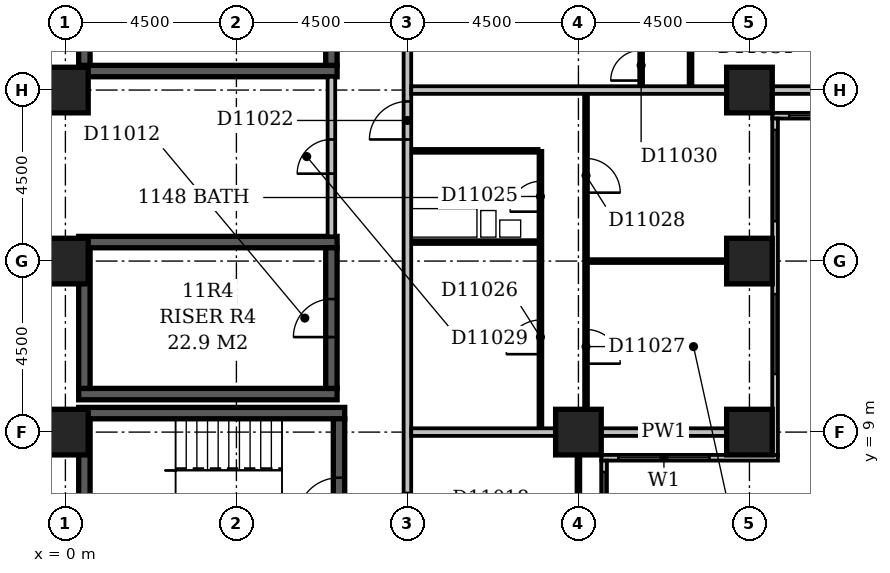
"""IFC4 building model, lengths in metres.
Left out: names, types, materials, properties, quantities, classifications, styles, units other than length and angle.
Written with IfcOpenShell. Run it as: python <this file> out.ifc"""

import sys

from ifc_helpers import new_model, si_unit, direction, frame, frame_2d, origin, origin_2d, place, context, subcontext, project, spatial, rectangle, extrude, element, fill, save


model = new_model("IFC4")
c1 = context("Model", 3, precision=1e-05, world=origin(), true_north=direction((0.0, 1.0)))
c2 = subcontext(c1, "Body", "Model", "MODEL_VIEW")
j1 = project(units=[si_unit("LENGTHUNIT", "METRE"), si_unit("PLANEANGLEUNIT", "RADIAN")], contexts=[c1])
p1 = place(None, origin())
s1 = spatial("IfcSite", under=j1, at=p1, CompositionType="ELEMENT")
p2 = place(p1, origin())
s2 = spatial("IfcBuilding", under=s1, at=p2, CompositionType="ELEMENT")
p3 = place(p2, frame((0.0, 0.0, 50.6)))
s3 = spatial("IfcBuildingStorey", under=s2, at=p3, CompositionType="ELEMENT", Elevation=50.6)
p4 = place(p3, frame((0.35, 9.5, -0.3), z_axis=(0.0, 0.0, 1.0), x_axis=(1.0, 0.0, 0.0)))
e1 = element("IfcWall", 1, at=p4, inside=s3, PredefinedType="SHEAR", context=c2, shape_type="SweptSolid", body=[
    extrude(rectangle(XDim=7.0, YDim=0.3, at=frame_2d((3.5, 0.0))), origin(), (0.0, 0.0, 1.0), 3.6),
])
for number, where, z_axis, x_axis in (
    (2, (0.35, 10.0, -0.3), (0.0, 0.0, 1.0), (1.0, 0.0, 0.0)),
    (3, (0.35, 14.0, -0.3), (0.0, 0.0, 1.0), (1.0, 0.0, 0.0)),
    (4, (0.35, 18.5, -0.3), (0.0, 0.0, 1.0), (1.0, 0.0, 0.0)),
):
    element("IfcWall", number, at=place(p3, frame(where, z_axis=z_axis, x_axis=x_axis)), inside=s3, PredefinedType="SHEAR", context=c2, shape_type="SweptSolid", body=[
        extrude(rectangle(XDim=6.8, YDim=0.3, at=frame_2d((3.4, 0.0))), origin(), (0.0, 0.0, 1.0), 3.6),
    ])
p5 = place(p3, frame((0.5, 5.15, -0.3), z_axis=(0.0, 0.0, 1.0), x_axis=(0.0, 1.0, 0.0)))
e5 = element("IfcWall", 5, at=p5, inside=s3, PredefinedType="SHEAR", context=c2, shape_type="SweptSolid", body=[
    extrude(rectangle(XDim=4.2, YDim=0.3, at=frame_2d((2.1, 0.0))), origin(), (0.0, 0.0, 1.0), 3.6),
])
for number, where, z_axis, x_axis in (
    (6, (0.5, 10.15, -0.3), (0.0, 0.0, 1.0), (0.0, 1.0, 0.0)),
    (7, (0.5, 18.65, -0.3), (0.0, 0.0, 1.0), (0.0, 1.0, 0.0)),
):
    element("IfcWall", number, at=place(p3, frame(where, z_axis=z_axis, x_axis=x_axis)), inside=s3, PredefinedType="SHEAR", context=c2, shape_type="SweptSolid", body=[
        extrude(rectangle(XDim=3.7, YDim=0.3, at=frame_2d((1.85, 0.0))), origin(), (0.0, 0.0, 1.0), 3.6),
    ])
p6 = place(p3, frame((7.0, 10.15, -0.3), z_axis=(0.0, 0.0, 1.0), x_axis=(0.0, 1.0, 0.0)))
e8 = element("IfcWall", 8, at=p6, inside=s3, PredefinedType="SHEAR", context=c2, shape_type="SweptSolid", body=[
    extrude(rectangle(XDim=3.7, YDim=0.3, at=frame_2d((1.85, 0.0))), origin(), (0.0, 0.0, 1.0), 3.6),
])
p7 = place(p6, frame((1.35, 0.0, 0.3)))
e9 = element("IfcOpeningElement", 9, at=p7, cuts=e8, PredefinedType="OPENING", context=c2, shape_type="SweptSolid", body=[
    extrude(rectangle(XDim=1.0, YDim=2.1, at=frame_2d((0.5, 1.05))), frame((0.0, 0.162, 0.0), z_axis=(0.0, -1.0, 0.0), x_axis=(1.0, 0.0, 0.0)), (0.0, 0.0, 1.0), 0.324),
])
p8 = place(p3, frame((7.0, 18.65, -0.3), z_axis=(0.0, 0.0, 1.0), x_axis=(0.0, 1.0, 0.0)))
e10 = element("IfcWall", 10, at=p8, inside=s3, PredefinedType="SHEAR", context=c2, shape_type="SweptSolid", body=[
    extrude(rectangle(XDim=3.7, YDim=0.3, at=frame_2d((1.85, 0.0))), origin(), (0.0, 0.0, 1.0), 3.6),
])
p9 = place(p8, frame((1.35, 0.0, 0.3)))
e11 = element("IfcOpeningElement", 11, at=p9, cuts=e10, PredefinedType="OPENING", context=c2, shape_type="SweptSolid", body=[
    extrude(rectangle(XDim=1.0, YDim=2.1, at=frame_2d((0.5, 1.05))), frame((0.0, 0.162, 0.0), z_axis=(0.0, -1.0, 0.0), x_axis=(1.0, 0.0, 0.0)), (0.0, 0.0, 1.0), 0.324),
])
p10 = place(p3, frame((7.2, 5.15, -0.3), z_axis=(0.0, 0.0, 1.0), x_axis=(0.0, 1.0, 0.0)))
e12 = element("IfcWall", 12, at=p10, inside=s3, PredefinedType="SHEAR", context=c2, shape_type="SweptSolid", body=[
    extrude(rectangle(XDim=4.2, YDim=0.3, at=frame_2d((2.1, 0.0))), origin(), (0.0, 0.0, 1.0), 3.6),
])
p11 = place(p10, frame((1.55, 0.0, 0.3)))
e13 = element("IfcOpeningElement", 13, at=p11, cuts=e12, PredefinedType="OPENING", context=c2, shape_type="SweptSolid", body=[
    extrude(rectangle(XDim=1.1, YDim=2.1, at=frame_2d((0.55, 1.05))), frame((0.0, 0.162, 0.0), z_axis=(0.0, -1.0, 0.0), x_axis=(1.0, 0.0, 0.0)), (0.0, 0.0, 1.0), 0.324),
])
for number, where, z_axis, x_axis in (
    (14, (0.0, 9.0, -0.3), (0.0, 0.0, 1.0), (1.0, 0.0, 0.0)),
    (15, (13.5, 9.0, -0.3), (0.0, 0.0, 1.0), (1.0, 0.0, 0.0)),
    (16, (18.0, 9.0, -0.3), (0.0, 0.0, 1.0), (1.0, 0.0, 0.0)),
    (17, (0.0, 13.5, -0.3), (0.0, 0.0, 1.0), (1.0, 0.0, 0.0)),
    (18, (18.0, 13.5, -0.3), (0.0, 0.0, 1.0), (1.0, 0.0, 0.0)),
    (19, (0.0, 18.0, -0.3), (0.0, 0.0, 1.0), (1.0, 0.0, 0.0)),
    (20, (18.0, 18.0, -0.3), (0.0, 0.0, 1.0), (1.0, 0.0, 0.0)),
):
    element("IfcColumn", number, at=place(p3, frame(where, z_axis=z_axis, x_axis=x_axis)), inside=s3, PredefinedType="COLUMN", context=c2, shape_type="SweptSolid", body=[
        extrude(rectangle(XDim=1.2, YDim=1.2, at=origin_2d()), origin(), (0.0, 0.0, 1.0), 3.6),
    ])
p12 = place(p3, frame((14.175, 3.9, 0.0), z_axis=(0.0, 0.0, 1.0), x_axis=(0.0, 1.0, 0.0)))
e21 = element("IfcWall", 21, at=p12, inside=s3, PredefinedType="STANDARD", context=c2, shape_type="SweptSolid", body=[
    extrude(rectangle(XDim=4.35, YDim=0.15, at=frame_2d((2.175, 0.0))), origin(), (0.0, 0.0, 1.0), 2.7),
])
p13 = place(p12, frame((1.65, 0.0, 0.6)))
e22 = element("IfcOpeningElement", 22, at=p13, cuts=e21, PredefinedType="OPENING", context=c2, shape_type="SweptSolid", body=[
    extrude(rectangle(XDim=2.4, YDim=1.8, at=frame_2d((1.2, 0.9))), frame((0.0, 0.087, 0.0), z_axis=(0.0, -1.0, 0.0), x_axis=(1.0, 0.0, 0.0)), (0.0, 0.0, 1.0), 0.174),
])
p14 = place(p3, frame((14.1, 8.325, 0.0), z_axis=(0.0, 0.0, 1.0), x_axis=(1.0, 0.0, 0.0)))
e23 = element("IfcWall", 23, at=p14, inside=s3, PredefinedType="STANDARD", context=c2, shape_type="SweptSolid", body=[
    extrude(rectangle(XDim=4.65, YDim=0.15, at=frame_2d((2.325, 0.0))), origin(), (0.0, 0.0, 1.0), 2.7),
])
p15 = place(p14, frame((0.45, 0.0, 0.6)))
e24 = element("IfcOpeningElement", 24, at=p15, cuts=e23, PredefinedType="OPENING", context=c2, shape_type="SweptSolid", body=[
    extrude(rectangle(XDim=2.4, YDim=1.8, at=frame_2d((1.2, 0.9))), frame((0.0, 0.087, 0.0), z_axis=(0.0, -1.0, 0.0), x_axis=(1.0, 0.0, 0.0)), (0.0, 0.0, 1.0), 0.174),
])
p16 = place(p3, frame((18.675, 8.4, 0.0), z_axis=(0.0, 0.0, 1.0), x_axis=(0.0, 1.0, 0.0)))
e25 = element("IfcWall", 25, at=p16, inside=s3, PredefinedType="STANDARD", context=c2, shape_type="SweptSolid", body=[
    extrude(rectangle(XDim=8.85, YDim=0.15, at=frame_2d((4.425, 0.0))), origin(), (0.0, 0.0, 1.0), 2.7),
])
p17 = place(p16, frame((2.13, 0.0, 0.6)))
e26 = element("IfcOpeningElement", 26, at=p17, cuts=e25, PredefinedType="OPENING", context=c2, shape_type="SweptSolid", body=[
    extrude(rectangle(XDim=2.1, YDim=1.8, at=frame_2d((1.05, 0.9))), frame((0.0, 0.087, 0.0), z_axis=(0.0, -1.0, 0.0), x_axis=(1.0, 0.0, 0.0)), (0.0, 0.0, 1.0), 0.174),
])
p18 = place(p16, frame((6.15, 0.0, 0.6)))
e27 = element("IfcOpeningElement", 27, at=p18, cuts=e25, PredefinedType="OPENING", context=c2, shape_type="SweptSolid", body=[
    extrude(rectangle(XDim=2.4, YDim=1.8, at=frame_2d((1.2, 0.9))), frame((0.0, 0.087, 0.0), z_axis=(0.0, -1.0, 0.0), x_axis=(1.0, 0.0, 0.0)), (0.0, 0.0, 1.0), 0.174),
])
p19 = place(p3, frame((18.6, 17.325, 0.0), z_axis=(0.0, 0.0, 1.0), x_axis=(1.0, 0.0, 0.0)))
e28 = element("IfcWall", 28, at=p19, inside=s3, PredefinedType="STANDARD", context=c2, shape_type="SweptSolid", body=[
    extrude(rectangle(XDim=4.65, YDim=0.15, at=frame_2d((2.325, 0.0))), origin(), (0.0, 0.0, 1.0), 2.7),
])
p20 = place(p19, frame((0.45, 0.0, 0.6)))
e29 = element("IfcOpeningElement", 29, at=p20, cuts=e28, PredefinedType="OPENING", context=c2, shape_type="SweptSolid", body=[
    extrude(rectangle(XDim=2.4, YDim=1.8, at=frame_2d((1.2, 0.9))), frame((0.0, 0.087, 0.0), z_axis=(0.0, -1.0, 0.0), x_axis=(1.0, 0.0, 0.0)), (0.0, 0.0, 1.0), 0.174),
])
p21 = place(p3, frame((9.0, 5.0, 0.0), z_axis=(0.0, 0.0, 1.0), x_axis=(0.0, 1.0, 0.0)))
e30 = element("IfcWall", 30, at=p21, inside=s3, PredefinedType="PARTITIONING", context=c2, shape_type="SweptSolid", body=[
    extrude(rectangle(XDim=44.5, YDim=0.2, at=frame_2d((22.25, 0.0))), origin(), (0.0, 0.0, 1.0), 3.3),
])
p22 = place(p21, frame((28.45, 0.0, 0.0)))
e31 = element("IfcOpeningElement", 31, at=p22, cuts=e30, PredefinedType="OPENING", context=c2, shape_type="SweptSolid", body=[
    extrude(rectangle(XDim=1.0, YDim=2.1, at=frame_2d((0.5, 1.05))), frame((0.0, 0.112, 0.0), z_axis=(0.0, -1.0, 0.0), x_axis=(1.0, 0.0, 0.0)), (0.0, 0.0, 1.0), 0.224),
])
p23 = place(p21, frame((17.8, 0.0, 0.0)))
e32 = element("IfcOpeningElement", 32, at=p23, cuts=e30, PredefinedType="OPENING", context=c2, shape_type="SweptSolid", body=[
    extrude(rectangle(XDim=1.0, YDim=2.1, at=frame_2d((0.5, 1.05))), frame((0.0, 0.112, 0.0), z_axis=(0.0, -1.0, 0.0), x_axis=(1.0, 0.0, 0.0)), (0.0, 0.0, 1.0), 0.224),
])
p24 = place(p21, frame((14.55, 0.0, 0.0)))
e33 = element("IfcOpeningElement", 33, at=p24, cuts=e30, PredefinedType="OPENING", context=c2, shape_type="SweptSolid", body=[
    extrude(rectangle(XDim=1.0, YDim=2.1, at=frame_2d((0.5, 1.05))), frame((0.0, 0.112, 0.0), z_axis=(0.0, -1.0, 0.0), x_axis=(1.0, 0.0, 0.0)), (0.0, 0.0, 1.0), 0.224),
])
p25 = place(p21, frame((11.7, 0.0, 0.0)))
e34 = element("IfcOpeningElement", 34, at=p25, cuts=e30, PredefinedType="OPENING", context=c2, shape_type="SweptSolid", body=[
    extrude(rectangle(XDim=1.0, YDim=2.1, at=frame_2d((0.5, 1.05))), frame((0.0, 0.112, 0.0), z_axis=(0.0, -1.0, 0.0), x_axis=(1.0, 0.0, 0.0)), (0.0, 0.0, 1.0), 0.224),
])
p26 = place(p21, frame((35.0, 0.0, 0.0)))
e35 = element("IfcOpeningElement", 35, at=p26, cuts=e30, PredefinedType="OPENING", context=c2, shape_type="SweptSolid", body=[
    extrude(rectangle(XDim=0.9, YDim=2.1, at=frame_2d((0.45, 1.05))), frame((0.0, 0.112, 0.0), z_axis=(0.0, -1.0, 0.0), x_axis=(1.0, 0.0, 0.0)), (0.0, 0.0, 1.0), 0.224),
])
p27 = place(p21, frame((1.5, 0.0, 0.0)))
e36 = element("IfcOpeningElement", 36, at=p27, cuts=e30, PredefinedType="OPENING", context=c2, shape_type="SweptSolid", body=[
    extrude(rectangle(XDim=0.9, YDim=2.1, at=frame_2d((0.45, 1.05))), frame((0.0, 0.112, 0.0), z_axis=(0.0, -1.0, 0.0), x_axis=(1.0, 0.0, 0.0)), (0.0, 0.0, 1.0), 0.224),
])
p28 = place(p3, frame((13.5, 5.1, 0.0), z_axis=(0.0, 0.0, 1.0), x_axis=(0.0, 1.0, 0.0)))
e37 = element("IfcWall", 37, at=p28, inside=s3, PredefinedType="PARTITIONING", context=c2, shape_type="SweptSolid", body=[
    extrude(rectangle(XDim=3.3, YDim=0.1, at=frame_2d((1.65, 0.0))), origin(), (0.0, 0.0, 1.0), 2.7),
])
p29 = place(p3, frame((9.1, 9.0, 0.0), z_axis=(0.0, 0.0, 1.0), x_axis=(1.0, 0.0, 0.0)))
e38 = element("IfcWall", 38, at=p29, inside=s3, PredefinedType="PARTITIONING", context=c2, shape_type="SweptSolid", body=[
    extrude(rectangle(XDim=3.8, YDim=0.2, at=frame_2d((1.9, 0.0))), origin(), (0.0, 0.0, 1.0), 3.3),
])
p30 = place(p3, frame((14.1, 9.0, 0.0), z_axis=(0.0, 0.0, 1.0), x_axis=(1.0, 0.0, 0.0)))
e39 = element("IfcWall", 39, at=p30, inside=s3, PredefinedType="PARTITIONING", context=c2, shape_type="SweptSolid", body=[
    extrude(rectangle(XDim=3.3, YDim=0.2, at=frame_2d((1.65, 0.0))), origin(), (0.0, 0.0, 1.0), 2.7),
])
p31 = place(p3, frame((12.5, 9.1, 0.0), z_axis=(0.0, 0.0, 1.0), x_axis=(0.0, 1.0, 0.0)))
e40 = element("IfcWall", 40, at=p31, inside=s3, PredefinedType="PARTITIONING", context=c2, shape_type="SweptSolid", body=[
    extrude(rectangle(XDim=7.3, YDim=0.1, at=frame_2d((3.65, 0.0))), origin(), (0.0, 0.0, 1.0), 3.3),
])
p32 = place(p31, frame((5.7, 0.0, 0.0)))
e41 = element("IfcOpeningElement", 41, at=p32, cuts=e40, PredefinedType="OPENING", context=c2, shape_type="SweptSolid", body=[
    extrude(rectangle(XDim=0.8, YDim=2.1, at=frame_2d((0.4, 1.05))), frame((0.0, 0.062, 0.0), z_axis=(0.0, -1.0, 0.0), x_axis=(1.0, 0.0, 0.0)), (0.0, 0.0, 1.0), 0.124),
])
p33 = place(p31, frame((1.95, 0.0, 0.0)))
e42 = element("IfcOpeningElement", 42, at=p33, cuts=e40, PredefinedType="OPENING", context=c2, shape_type="SweptSolid", body=[
    extrude(rectangle(XDim=0.9, YDim=2.1, at=frame_2d((0.45, 1.05))), frame((0.0, 0.062, 0.0), z_axis=(0.0, -1.0, 0.0), x_axis=(1.0, 0.0, 0.0)), (0.0, 0.0, 1.0), 0.124),
])
p34 = place(p3, frame((13.7, 9.6, 0.0), z_axis=(0.0, 0.0, 1.0), x_axis=(0.0, 1.0, 0.0)))
e43 = element("IfcWall", 43, at=p34, inside=s3, PredefinedType="PARTITIONING", context=c2, shape_type="SweptSolid", body=[
    extrude(rectangle(XDim=8.3, YDim=0.1, at=frame_2d((4.15, 0.0))), origin(), (0.0, 0.0, 1.0), 3.3),
])
p35 = place(p34, frame((1.2, 0.0, 0.0)))
e44 = element("IfcOpeningElement", 44, at=p35, cuts=e43, PredefinedType="OPENING", context=c2, shape_type="SweptSolid", body=[
    extrude(rectangle(XDim=0.9, YDim=2.1, at=frame_2d((0.45, 1.05))), frame((0.0, 0.062, 0.0), z_axis=(0.0, -1.0, 0.0), x_axis=(1.0, 0.0, 0.0)), (0.0, 0.0, 1.0), 0.124),
])
p36 = place(p34, frame((5.7, 0.0, 0.0)))
e45 = element("IfcOpeningElement", 45, at=p36, cuts=e43, PredefinedType="OPENING", context=c2, shape_type="SweptSolid", body=[
    extrude(rectangle(XDim=0.9, YDim=2.1, at=frame_2d((0.45, 1.05))), frame((0.0, 0.062, 0.0), z_axis=(0.0, -1.0, 0.0), x_axis=(1.0, 0.0, 0.0)), (0.0, 0.0, 1.0), 0.124),
])
p37 = place(p3, frame((13.75, 13.5, 0.0), z_axis=(0.0, 0.0, 1.0), x_axis=(1.0, 0.0, 0.0)))
e46 = element("IfcWall", 46, at=p37, inside=s3, PredefinedType="PARTITIONING", context=c2, shape_type="SweptSolid", body=[
    extrude(rectangle(XDim=3.65, YDim=0.1, at=frame_2d((1.825, 0.0))), origin(), (0.0, 0.0, 1.0), 3.3),
])
p38 = place(p3, frame((9.1, 14.0, 0.0), z_axis=(0.0, 0.0, 1.0), x_axis=(1.0, 0.0, 0.0)))
e47 = element("IfcWall", 47, at=p38, inside=s3, PredefinedType="PLUMBINGWALL", context=c2, shape_type="SweptSolid", body=[
    extrude(rectangle(XDim=3.35, YDim=0.1, at=frame_2d((1.675, 0.0))), origin(), (0.0, 0.0, 1.0), 3.3),
])
p39 = place(p3, frame((7.0, 14.15, 0.0), z_axis=(0.0, 0.0, 1.0), x_axis=(0.0, 1.0, 0.0)))
e48 = element("IfcWall", 48, at=p39, inside=s3, PredefinedType="PARTITIONING", context=c2, shape_type="SweptSolid", body=[
    extrude(rectangle(XDim=4.2, YDim=0.2, at=frame_2d((2.1, 0.0))), origin(), (0.0, 0.0, 1.0), 3.3),
])
p40 = place(p39, frame((1.65, 0.0, 0.0)))
e49 = element("IfcOpeningElement", 49, at=p40, cuts=e48, PredefinedType="OPENING", context=c2, shape_type="SweptSolid", body=[
    extrude(rectangle(XDim=0.9, YDim=2.1, at=frame_2d((0.45, 1.05))), frame((0.0, 0.112, 0.0), z_axis=(0.0, -1.0, 0.0), x_axis=(1.0, 0.0, 0.0)), (0.0, 0.0, 1.0), 0.224),
])
p41 = place(p3, frame((9.1, 16.4, 0.0), z_axis=(0.0, 0.0, 1.0), x_axis=(1.0, 0.0, 0.0)))
e50 = element("IfcWall", 50, at=p41, inside=s3, PredefinedType="PLUMBINGWALL", context=c2, shape_type="SweptSolid", body=[
    extrude(rectangle(XDim=3.35, YDim=0.1, at=frame_2d((1.675, 0.0))), origin(), (0.0, 0.0, 1.0), 3.3),
])
p42 = place(p3, frame((9.1, 18.0, 0.0), z_axis=(0.0, 0.0, 1.0), x_axis=(1.0, 0.0, 0.0)))
e51 = element("IfcWall", 51, at=p42, inside=s3, PredefinedType="PARTITIONING", context=c2, shape_type="SweptSolid", body=[
    extrude(rectangle(XDim=8.3, YDim=0.2, at=frame_2d((4.15, 0.0))), origin(), (0.0, 0.0, 1.0), 2.6),
])
p43 = place(p3, frame((18.6, 18.0, 0.0), z_axis=(0.0, 0.0, 1.0), x_axis=(1.0, 0.0, 0.0)))
e52 = element("IfcWall", 52, at=p43, inside=s3, PredefinedType="PARTITIONING", context=c2, shape_type="SweptSolid", body=[
    extrude(rectangle(XDim=3.3, YDim=0.2, at=frame_2d((1.65, 0.0))), origin(), (0.0, 0.0, 1.0), 2.7),
])
p44 = place(p3, frame((15.15, 18.1, 0.0), z_axis=(0.0, 0.0, 1.0), x_axis=(0.0, 1.0, 0.0)))
e53 = element("IfcWall", 53, at=p44, inside=s3, PredefinedType="PARTITIONING", context=c2, shape_type="SweptSolid", body=[
    extrude(rectangle(XDim=1.2, YDim=0.1, at=frame_2d((0.6, 0.0))), origin(), (0.0, 0.0, 1.0), 3.3),
])
p45 = place(p44, frame((0.15, 0.0, 0.0)))
e54 = element("IfcOpeningElement", 54, at=p45, cuts=e53, PredefinedType="OPENING", context=c2, shape_type="SweptSolid", body=[
    extrude(rectangle(XDim=0.8, YDim=2.1, at=frame_2d((0.4, 1.05))), frame((0.0, 0.062, 0.0), z_axis=(0.0, -1.0, 0.0), x_axis=(1.0, 0.0, 0.0)), (0.0, 0.0, 1.0), 0.124),
])
p46 = place(p3, frame((16.45, 18.1, 0.0), z_axis=(0.0, 0.0, 1.0), x_axis=(0.0, 1.0, 0.0)))
e55 = element("IfcWall", 55, at=p46, inside=s3, PredefinedType="PARTITIONING", context=c2, shape_type="SweptSolid", body=[
    extrude(rectangle(XDim=4.3, YDim=0.1, at=frame_2d((2.15, 0.0))), origin(), (0.0, 0.0, 1.0), 3.3),
])
p47 = place(p46, frame((1.7, 0.0, 0.0)))
e56 = element("IfcOpeningElement", 56, at=p47, cuts=e55, PredefinedType="OPENING", context=c2, shape_type="SweptSolid", body=[
    extrude(rectangle(XDim=0.9, YDim=2.1, at=frame_2d((0.45, 1.05))), frame((0.0, 0.062, 0.0), z_axis=(0.0, -1.0, 0.0), x_axis=(1.0, 0.0, 0.0)), (0.0, 0.0, 1.0), 0.124),
])
p48 = place(p13, origin())
e57 = element("IfcWindow", 57, at=p48, inside=s3, PartitioningType="SINGLE_PANEL", PredefinedType="WINDOW", context=c2, shape_type="SweptSolid", body=[
    extrude(rectangle(XDim=2.4, YDim=1.8, at=frame_2d((1.2, 0.9))), frame((0.0, 0.03, 0.0), z_axis=(0.0, -1.0, 0.0), x_axis=(1.0, 0.0, 0.0)), (0.0, 0.0, 1.0), 0.06),
])
fill(e22, e57)
p49 = place(p15, origin())
e58 = element("IfcWindow", 58, at=p49, inside=s3, PartitioningType="SINGLE_PANEL", PredefinedType="WINDOW", context=c2, shape_type="SweptSolid", body=[
    extrude(rectangle(XDim=2.4, YDim=1.8, at=frame_2d((1.2, 0.9))), frame((0.0, 0.03, 0.0), z_axis=(0.0, -1.0, 0.0), x_axis=(1.0, 0.0, 0.0)), (0.0, 0.0, 1.0), 0.06),
])
fill(e24, e58)
p50 = place(p17, origin())
e59 = element("IfcWindow", 59, at=p50, inside=s3, PartitioningType="SINGLE_PANEL", PredefinedType="WINDOW", context=c2, shape_type="SweptSolid", body=[
    extrude(rectangle(XDim=2.1, YDim=1.8, at=frame_2d((1.05, 0.9))), frame((0.0, 0.03, 0.0), z_axis=(0.0, -1.0, 0.0), x_axis=(1.0, 0.0, 0.0)), (0.0, 0.0, 1.0), 0.06),
])
fill(e26, e59)
p51 = place(p18, origin())
e60 = element("IfcWindow", 60, at=p51, inside=s3, PartitioningType="SINGLE_PANEL", PredefinedType="WINDOW", context=c2, shape_type="SweptSolid", body=[
    extrude(rectangle(XDim=2.4, YDim=1.8, at=frame_2d((1.2, 0.9))), frame((0.0, 0.03, 0.0), z_axis=(0.0, -1.0, 0.0), x_axis=(1.0, 0.0, 0.0)), (0.0, 0.0, 1.0), 0.06),
])
fill(e27, e60)
p52 = place(p20, origin())
e61 = element("IfcWindow", 61, at=p52, inside=s3, PartitioningType="SINGLE_PANEL", PredefinedType="WINDOW", context=c2, shape_type="SweptSolid", body=[
    extrude(rectangle(XDim=2.4, YDim=1.8, at=frame_2d((1.2, 0.9))), frame((0.0, 0.03, 0.0), z_axis=(0.0, -1.0, 0.0), x_axis=(1.0, 0.0, 0.0)), (0.0, 0.0, 1.0), 0.06),
])
fill(e29, e61)
p53 = place(p7, origin())
e62 = element("IfcDoor", 62, at=p53, inside=s3, OperationType="SINGLE_SWING_LEFT", PredefinedType="DOOR", context=c2, shape_type="SweptSolid", body=[
    extrude(rectangle(XDim=1.0, YDim=2.1, at=frame_2d((0.5, 1.05))), frame((0.0, 0.025, 0.0), z_axis=(0.0, -1.0, 0.0), x_axis=(1.0, 0.0, 0.0)), (0.0, 0.0, 1.0), 0.05),
])
fill(e9, e62)
p54 = place(p11, origin())
e63 = element("IfcDoor", 63, at=p54, inside=s3, OperationType="SINGLE_SWING_LEFT", PredefinedType="DOOR", context=c2, shape_type="SweptSolid", body=[
    extrude(rectangle(XDim=1.1, YDim=2.1, at=frame_2d((0.55, 1.05))), frame((0.0, 0.025, 0.0), z_axis=(0.0, -1.0, 0.0), x_axis=(1.0, 0.0, 0.0)), (0.0, 0.0, 1.0), 0.05),
])
fill(e13, e63)
p55 = place(p25, origin())
e64 = element("IfcDoor", 64, at=p55, inside=s3, OperationType="SINGLE_SWING_LEFT", PredefinedType="DOOR", context=c2, shape_type="SweptSolid", body=[
    extrude(rectangle(XDim=1.0, YDim=2.1, at=frame_2d((0.5, 1.05))), frame((0.0, 0.025, 0.0), z_axis=(0.0, -1.0, 0.0), x_axis=(1.0, 0.0, 0.0)), (0.0, 0.0, 1.0), 0.05),
])
fill(e34, e64)
p56 = place(p32, origin())
e65 = element("IfcDoor", 65, at=p56, inside=s3, OperationType="SINGLE_SWING_LEFT", PredefinedType="DOOR", context=c2, shape_type="SweptSolid", body=[
    extrude(rectangle(XDim=0.8, YDim=2.1, at=frame_2d((0.4, 1.05))), frame((0.0, 0.025, 0.0), z_axis=(0.0, -1.0, 0.0), x_axis=(1.0, 0.0, 0.0)), (0.0, 0.0, 1.0), 0.05),
])
fill(e41, e65)
p57 = place(p33, origin())
e66 = element("IfcDoor", 66, at=p57, inside=s3, OperationType="SINGLE_SWING_LEFT", PredefinedType="DOOR", context=c2, shape_type="SweptSolid", body=[
    extrude(rectangle(XDim=0.9, YDim=2.1, at=frame_2d((0.45, 1.05))), frame((0.0, 0.025, 0.0), z_axis=(0.0, -1.0, 0.0), x_axis=(1.0, 0.0, 0.0)), (0.0, 0.0, 1.0), 0.05),
])
fill(e42, e66)
p58 = place(p35, frame((0.9, 0.0, 0.0), z_axis=(0.0, 0.0, 1.0), x_axis=(-1.0, 0.0, 0.0)))
e67 = element("IfcDoor", 67, at=p58, inside=s3, OperationType="SINGLE_SWING_RIGHT", PredefinedType="DOOR", context=c2, shape_type="SweptSolid", body=[
    extrude(rectangle(XDim=0.9, YDim=2.1, at=frame_2d((0.45, 1.05))), frame((0.0, 0.025, 0.0), z_axis=(0.0, -1.0, 0.0), x_axis=(1.0, 0.0, 0.0)), (0.0, 0.0, 1.0), 0.05),
])
fill(e44, e67)
p59 = place(p36, frame((0.9, 0.0, 0.0), z_axis=(0.0, 0.0, 1.0), x_axis=(-1.0, 0.0, 0.0)))
e68 = element("IfcDoor", 68, at=p59, inside=s3, OperationType="SINGLE_SWING_RIGHT", PredefinedType="DOOR", context=c2, shape_type="SweptSolid", body=[
    extrude(rectangle(XDim=0.9, YDim=2.1, at=frame_2d((0.45, 1.05))), frame((0.0, 0.025, 0.0), z_axis=(0.0, -1.0, 0.0), x_axis=(1.0, 0.0, 0.0)), (0.0, 0.0, 1.0), 0.05),
])
fill(e45, e68)
p60 = place(p40, origin())
e69 = element("IfcDoor", 69, at=p60, inside=s3, OperationType="SINGLE_SWING_LEFT", PredefinedType="DOOR", context=c2, shape_type="SweptSolid", body=[
    extrude(rectangle(XDim=0.9, YDim=2.1, at=frame_2d((0.45, 1.05))), frame((0.0, 0.025, 0.0), z_axis=(0.0, -1.0, 0.0), x_axis=(1.0, 0.0, 0.0)), (0.0, 0.0, 1.0), 0.05),
])
fill(e49, e69)
p61 = place(p45, origin())
e70 = element("IfcDoor", 70, at=p61, inside=s3, OperationType="SINGLE_SWING_LEFT", PredefinedType="DOOR", context=c2, shape_type="SweptSolid", body=[
    extrude(rectangle(XDim=0.8, YDim=2.1, at=frame_2d((0.4, 1.05))), frame((0.0, 0.025, 0.0), z_axis=(0.0, -1.0, 0.0), x_axis=(1.0, 0.0, 0.0)), (0.0, 0.0, 1.0), 0.05),
])
fill(e54, e70)
save(model, sys.argv[1])
